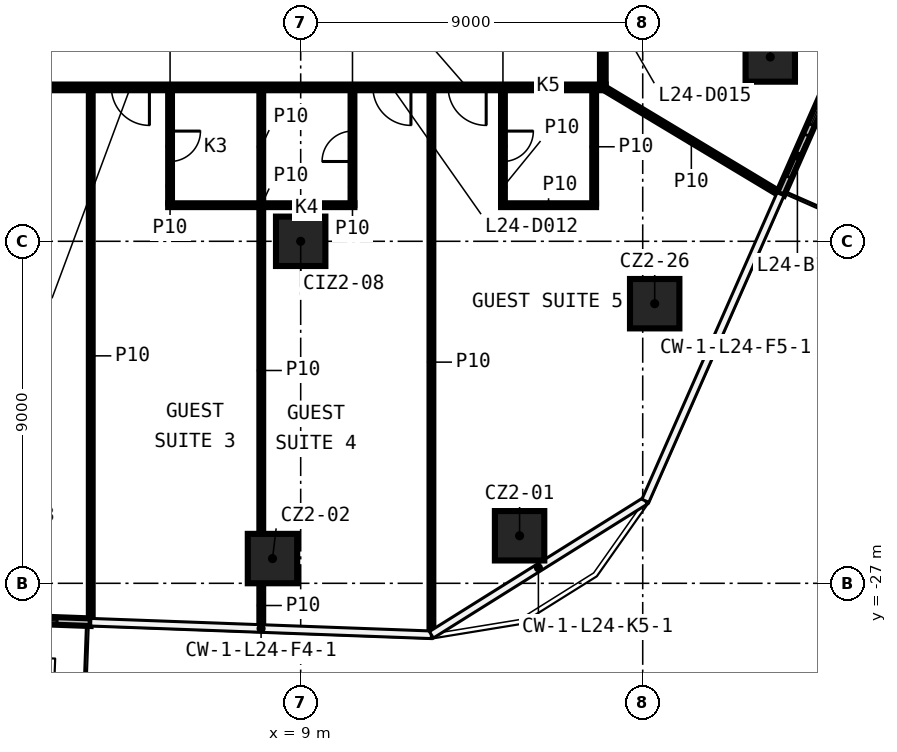
"""IFC4 building model, lengths in metres.
Left out: names, types, materials, properties, quantities, classifications, styles, units other than length and angle.
Written with IfcOpenShell. Run it as: python <this file> out.ifc"""

import sys

from ifc_helpers import new_model, si_unit, direction, frame, frame_2d, origin, origin_2d, place, context, subcontext, project, spatial, rectangle, extrude, element, fill, save


model = new_model("IFC4")
c1 = context("Model", 3, precision=1e-05, world=origin(), true_north=direction((0.0, 1.0)))
c2 = subcontext(c1, "Body", "Model", "MODEL_VIEW")
j1 = project(units=[si_unit("LENGTHUNIT", "METRE"), si_unit("PLANEANGLEUNIT", "RADIAN")], contexts=[c1])
p1 = place(None, origin())
s1 = spatial("IfcSite", under=j1, at=p1, CompositionType="ELEMENT")
p2 = place(p1, origin())
s2 = spatial("IfcBuilding", under=s1, at=p2, CompositionType="ELEMENT")
p3 = place(p2, frame((0.0, 0.0, 113.7)))
s3 = spatial("IfcBuildingStorey", under=s2, at=p3, CompositionType="ELEMENT", Elevation=113.7)
for number, where, z_axis, x_axis in (
    (1, (14.76, -25.749, 0.0), (0.0, 0.0, 1.0), (1.0, 0.0, 0.0)),
    (2, (8.258, -26.349, 0.0), (0.0, 0.0, 1.0), (1.0, 0.0, 0.0)),
    (3, (21.356, -13.15, 0.0), (0.0, 0.0, 1.0), (1.0, 0.0, 0.0)),
    (4, (18.315, -19.642, 0.0), (0.0, 0.0, 1.0), (1.0, 0.0, 0.0)),
    (5, (9.0, -18.0, 0.0), (0.0, 0.0, 1.0), (1.0, 0.0, 0.0)),
):
    element("IfcColumn", number, at=place(p3, frame(where, z_axis=z_axis, x_axis=x_axis)), inside=s3, PredefinedType="COLUMN", context=c2, shape_type="SweptSolid", body=[
        extrude(rectangle(XDim=1.3, YDim=1.3, at=origin_2d()), origin(), (0.0, 0.0, 1.0), 3.3),
    ])
p4 = place(p3, frame((5.513, -17.05, 0.0), z_axis=(0.0, 0.0, 1.0), x_axis=(1.0, 0.0, 0.0)))
e6 = element("IfcWall", 6, at=p4, inside=s3, PredefinedType="PARTITIONING", context=c2, shape_type="SweptSolid", body=[
    extrude(rectangle(XDim=4.9, YDim=0.1, at=frame_2d((2.45, 0.0))), origin(), (0.0, 0.0, 1.0), 3.3),
])
p5 = place(p3, frame((14.272, -17.05, 0.0), z_axis=(0.0, 0.0, 1.0), x_axis=(1.0, 0.0, 0.0)))
e7 = element("IfcWall", 7, at=p5, inside=s3, PredefinedType="PARTITIONING", context=c2, shape_type="SweptSolid", body=[
    extrude(rectangle(XDim=2.5, YDim=0.1, at=frame_2d((1.25, 0.0))), origin(), (0.0, 0.0, 1.0), 3.3),
])
p6 = place(p3, frame((17.025, -13.95, 0.0), z_axis=(0.0, 0.0, 1.0), x_axis=(-1.0, 0.0, 0.0)))
e8 = element("IfcWall", 8, at=p6, inside=s3, PredefinedType="PARTITIONING", context=c2, shape_type="SweptSolid", body=[
    extrude(rectangle(XDim=34.05, YDim=0.15, at=frame_2d((17.025, 0.0))), origin(), (0.0, 0.0, 1.0), 3.3),
])
p7 = place(p6, frame((31.974, 0.0, 0.0)))
e9 = element("IfcOpeningElement", 9, at=p7, cuts=e8, PredefinedType="OPENING", context=c2, shape_type="SweptSolid", body=[
    extrude(rectangle(XDim=0.9, YDim=2.1, at=frame_2d((0.45, 1.05))), frame((0.0, 0.085, 0.0), z_axis=(0.0, -1.0, 0.0), x_axis=(1.0, 0.0, 0.0)), (0.0, 0.0, 1.0), 0.17),
])
p8 = place(p6, frame((27.543, 0.0, 0.0)))
e10 = element("IfcOpeningElement", 10, at=p8, cuts=e8, PredefinedType="OPENING", context=c2, shape_type="SweptSolid", body=[
    extrude(rectangle(XDim=1.0, YDim=2.1, at=frame_2d((0.5, 1.05))), frame((0.0, 0.085, 0.0), z_axis=(0.0, -1.0, 0.0), x_axis=(1.0, 0.0, 0.0)), (0.0, 0.0, 1.0), 0.17),
])
p9 = place(p6, frame((16.333, 0.0, 0.0)))
e11 = element("IfcOpeningElement", 11, at=p9, cuts=e8, PredefinedType="OPENING", context=c2, shape_type="SweptSolid", body=[
    extrude(rectangle(XDim=1.0, YDim=2.1, at=frame_2d((0.5, 1.05))), frame((0.0, 0.085, 0.0), z_axis=(0.0, -1.0, 0.0), x_axis=(1.0, 0.0, 0.0)), (0.0, 0.0, 1.0), 0.17),
])
p10 = place(p6, frame((12.006, 0.0, 0.0)))
e12 = element("IfcOpeningElement", 12, at=p10, cuts=e8, PredefinedType="OPENING", context=c2, shape_type="SweptSolid", body=[
    extrude(rectangle(XDim=1.0, YDim=2.1, at=frame_2d((0.5, 1.05))), frame((0.0, 0.085, 0.0), z_axis=(0.0, -1.0, 0.0), x_axis=(1.0, 0.0, 0.0)), (0.0, 0.0, 1.0), 0.17),
])
p11 = place(p6, frame((5.124, 0.0, 0.0)))
e13 = element("IfcOpeningElement", 13, at=p11, cuts=e8, PredefinedType="OPENING", context=c2, shape_type="SweptSolid", body=[
    extrude(rectangle(XDim=1.0, YDim=2.1, at=frame_2d((0.5, 1.05))), frame((0.0, 0.085, 0.0), z_axis=(0.0, -1.0, 0.0), x_axis=(1.0, 0.0, 0.0)), (0.0, 0.0, 1.0), 0.17),
])
p12 = place(p6, frame((3.144, 0.0, 0.0)))
e14 = element("IfcOpeningElement", 14, at=p12, cuts=e8, PredefinedType="OPENING", context=c2, shape_type="SweptSolid", body=[
    extrude(rectangle(XDim=1.0, YDim=2.1, at=frame_2d((0.5, 1.05))), frame((0.0, 0.085, 0.0), z_axis=(0.0, -1.0, 0.0), x_axis=(1.0, 0.0, 0.0)), (0.0, 0.0, 1.0), 0.17),
])
p13 = place(p3, frame((16.95, 13.875, 0.0), z_axis=(0.0, 0.0, 1.0), x_axis=(0.0, -1.0, 0.0)))
e15 = element("IfcWall", 15, at=p13, inside=s3, PredefinedType="PARTITIONING", context=c2, shape_type="SweptSolid", body=[
    extrude(rectangle(XDim=27.75, YDim=0.15, at=frame_2d((13.875, 0.0))), origin(), (0.0, 0.0, 1.0), 3.3),
])
p14 = place(p13, frame((24.917, 0.0, 0.0)))
e16 = element("IfcOpeningElement", 16, at=p14, cuts=e15, PredefinedType="OPENING", context=c2, shape_type="SweptSolid", body=[
    extrude(rectangle(XDim=0.9, YDim=2.1, at=frame_2d((0.45, 1.05))), frame((0.0, 0.085, 0.0), z_axis=(0.0, -1.0, 0.0), x_axis=(1.0, 0.0, 0.0)), (0.0, 0.0, 1.0), 0.17),
])
p15 = place(p13, frame((20.086, 0.0, 0.0)))
e17 = element("IfcOpeningElement", 17, at=p15, cuts=e15, PredefinedType="OPENING", context=c2, shape_type="SweptSolid", body=[
    extrude(rectangle(XDim=0.9, YDim=2.1, at=frame_2d((0.45, 1.05))), frame((0.0, 0.085, 0.0), z_axis=(0.0, -1.0, 0.0), x_axis=(1.0, 0.0, 0.0)), (0.0, 0.0, 1.0), 0.17),
])
p16 = place(p13, frame((16.047, 0.0, 0.0)))
e18 = element("IfcOpeningElement", 18, at=p16, cuts=e15, PredefinedType="OPENING", context=c2, shape_type="SweptSolid", body=[
    extrude(rectangle(XDim=0.9, YDim=2.1, at=frame_2d((0.45, 1.05))), frame((0.0, 0.085, 0.0), z_axis=(0.0, -1.0, 0.0), x_axis=(1.0, 0.0, 0.0)), (0.0, 0.0, 1.0), 0.17),
])
p17 = place(p13, frame((11.091, 0.0, 0.0)))
e19 = element("IfcOpeningElement", 19, at=p17, cuts=e15, PredefinedType="OPENING", context=c2, shape_type="SweptSolid", body=[
    extrude(rectangle(XDim=0.9, YDim=2.1, at=frame_2d((0.45, 1.05))), frame((0.0, 0.085, 0.0), z_axis=(0.0, -1.0, 0.0), x_axis=(1.0, 0.0, 0.0)), (0.0, 0.0, 1.0), 0.17),
])
p18 = place(p13, frame((7.093, 0.0, 0.0)))
e20 = element("IfcOpeningElement", 20, at=p18, cuts=e15, PredefinedType="OPENING", context=c2, shape_type="SweptSolid", body=[
    extrude(rectangle(XDim=0.9, YDim=2.1, at=frame_2d((0.45, 1.05))), frame((0.0, 0.085, 0.0), z_axis=(0.0, -1.0, 0.0), x_axis=(1.0, 0.0, 0.0)), (0.0, 0.0, 1.0), 0.17),
])
p19 = place(p13, frame((2.057, 0.0, 0.0)))
e21 = element("IfcOpeningElement", 21, at=p19, cuts=e15, PredefinedType="OPENING", context=c2, shape_type="SweptSolid", body=[
    extrude(rectangle(XDim=0.9, YDim=2.1, at=frame_2d((0.45, 1.05))), frame((0.0, 0.085, 0.0), z_axis=(0.0, -1.0, 0.0), x_axis=(1.0, 0.0, 0.0)), (0.0, 0.0, 1.0), 0.17),
])
p20 = place(p3, frame((16.722, -17.0, 0.0), z_axis=(0.0, 0.0, 1.0), x_axis=(0.0, 1.0, 0.0)))
e22 = element("IfcWall", 22, at=p20, inside=s3, PredefinedType="PARTITIONING", context=c2, shape_type="SweptSolid", body=[
    extrude(rectangle(XDim=2.975, YDim=0.1, at=frame_2d((1.488, 0.0))), origin(), (0.0, 0.0, 1.0), 3.3),
])
p21 = place(p3, frame((14.322, -14.025, 0.0), z_axis=(0.0, 0.0, 1.0), x_axis=(0.0, -1.0, 0.0)))
e23 = element("IfcWall", 23, at=p21, inside=s3, PredefinedType="PARTITIONING", context=c2, shape_type="SweptSolid", body=[
    extrude(rectangle(XDim=3.025, YDim=0.1, at=frame_2d((1.513, 0.0))), origin(), (0.0, 0.0, 1.0), 3.3),
])
p22 = place(p21, frame((1.075, 0.0, 0.0)))
e24 = element("IfcOpeningElement", 24, at=p22, cuts=e23, PredefinedType="OPENING", context=c2, shape_type="SweptSolid", body=[
    extrude(rectangle(XDim=0.8, YDim=2.1, at=frame_2d((0.4, 1.05))), frame((0.0, 0.06, 0.0), z_axis=(0.0, -1.0, 0.0), x_axis=(1.0, 0.0, 0.0)), (0.0, 0.0, 1.0), 0.12),
])
p23 = place(p3, frame((12.44, -28.334, 0.0), z_axis=(0.0, 0.0, 1.0), x_axis=(0.0, 1.0, 0.0)))
e25 = element("IfcWall", 25, at=p23, inside=s3, PredefinedType="PARTITIONING", context=c2, shape_type="SweptSolid", body=[
    extrude(rectangle(XDim=14.31, YDim=0.1, at=frame_2d((7.155, 0.0))), origin(), (0.0, 0.0, 1.0), 3.3),
])
p24 = place(p3, frame((10.363, -17.05, 0.0), z_axis=(0.0, 0.0, 1.0), x_axis=(0.0, 1.0, 0.0)))
e26 = element("IfcWall", 26, at=p24, inside=s3, PredefinedType="PARTITIONING", context=c2, shape_type="SweptSolid", body=[
    extrude(rectangle(XDim=3.025, YDim=0.1, at=frame_2d((1.513, 0.0))), origin(), (0.0, 0.0, 1.0), 3.3),
])
p25 = place(p24, frame((1.15, 0.0, 0.0)))
e27 = element("IfcOpeningElement", 27, at=p25, cuts=e26, PredefinedType="OPENING", context=c2, shape_type="SweptSolid", body=[
    extrude(rectangle(XDim=0.8, YDim=2.1, at=frame_2d((0.4, 1.05))), frame((0.0, 0.06, 0.0), z_axis=(0.0, -1.0, 0.0), x_axis=(1.0, 0.0, 0.0)), (0.0, 0.0, 1.0), 0.12),
])
p26 = place(p3, frame((7.963, -28.17, 0.0), z_axis=(0.0, 0.0, 1.0), x_axis=(0.0, 1.0, 0.0)))
e28 = element("IfcWall", 28, at=p26, inside=s3, PredefinedType="PARTITIONING", context=c2, shape_type="SweptSolid", body=[
    extrude(rectangle(XDim=1.171, YDim=0.1, at=frame_2d((0.585, 0.0))), origin(), (0.0, 0.0, 1.0), 3.3),
])
p27 = place(p3, frame((7.963, -25.699, 0.0), z_axis=(0.0, 0.0, 1.0), x_axis=(0.0, 1.0, 0.0)))
e29 = element("IfcWall", 29, at=p27, inside=s3, PredefinedType="PARTITIONING", context=c2, shape_type="SweptSolid", body=[
    extrude(rectangle(XDim=8.599, YDim=0.1, at=frame_2d((4.299, 0.0))), origin(), (0.0, 0.0, 1.0), 3.3),
])
p28 = place(p3, frame((7.963, -17.0, 0.0), z_axis=(0.0, 0.0, 1.0), x_axis=(0.0, 1.0, 0.0)))
e30 = element("IfcWall", 30, at=p28, inside=s3, PredefinedType="PARTITIONING", context=c2, shape_type="SweptSolid", body=[
    extrude(rectangle(XDim=2.975, YDim=0.1, at=frame_2d((1.488, 0.0))), origin(), (0.0, 0.0, 1.0), 3.3),
])
p29 = place(p3, frame((5.563, -14.025, 0.0), z_axis=(0.0, 0.0, 1.0), x_axis=(0.0, -1.0, 0.0)))
e31 = element("IfcWall", 31, at=p29, inside=s3, PredefinedType="PARTITIONING", context=c2, shape_type="SweptSolid", body=[
    extrude(rectangle(XDim=2.975, YDim=0.1, at=frame_2d((1.488, 0.0))), origin(), (0.0, 0.0, 1.0), 3.3),
])
p30 = place(p29, frame((1.075, 0.0, 0.0)))
e32 = element("IfcOpeningElement", 32, at=p30, cuts=e31, PredefinedType="OPENING", context=c2, shape_type="SweptSolid", body=[
    extrude(rectangle(XDim=0.8, YDim=2.1, at=frame_2d((0.4, 1.05))), frame((0.0, 0.06, 0.0), z_axis=(0.0, -1.0, 0.0), x_axis=(1.0, 0.0, 0.0)), (0.0, 0.0, 1.0), 0.12),
])
p31 = place(p3, frame((3.476, -28.004, 0.0), z_axis=(0.0, 0.0, 1.0), x_axis=(0.0, 1.0, 0.0)))
e33 = element("IfcWall", 33, at=p31, inside=s3, PredefinedType="PARTITIONING", context=c2, shape_type="SweptSolid", body=[
    extrude(rectangle(XDim=13.979, YDim=0.1, at=frame_2d((6.99, 0.0))), origin(), (0.0, 0.0, 1.0), 3.3),
])
p32 = place(p3, frame((16.95, -13.95, 0.0), z_axis=(0.0, 0.0, 1.0), x_axis=(0.857183640751, -0.515010879525, 0.0)))
e34 = element("IfcWall", 34, at=p32, inside=s3, PredefinedType="PARTITIONING", context=c2, shape_type="SweptSolid", body=[
    extrude(rectangle(XDim=5.436, YDim=0.1, at=frame_2d((2.718, 0.0))), origin(), (0.0, 0.0, 1.0), 3.3),
])
p33 = place(p3, frame((-9.975, -27.528, 0.0), z_axis=(0.0, 0.0, 1.0), x_axis=(0.999319917794, -0.036874135924, 0.0)))
e35 = element("IfcWall", 35, at=p33, inside=s3, PredefinedType="SOLIDWALL", context=c2, shape_type="SweptSolid", body=[
    extrude(rectangle(XDim=13.46, YDim=0.2, at=frame_2d((6.73, 0.0))), origin(), (0.0, 0.0, 1.0), 3.3),
])
p34 = place(p33, frame((2.0, 0.0, 0.6)))
e36 = element("IfcOpeningElement", 36, at=p34, cuts=e35, PredefinedType="OPENING", context=c2, shape_type="SweptSolid", body=[
    extrude(rectangle(XDim=1.6, YDim=2.4, at=frame_2d((0.8, 1.2))), frame((0.0, 0.11, 0.0), z_axis=(0.0, -1.0, 0.0), x_axis=(1.0, 0.0, 0.0)), (0.0, 0.0, 1.0), 0.22),
])
p35 = place(p33, frame((0.5, 0.0, 0.0)))
e37 = element("IfcOpeningElement", 37, at=p35, cuts=e35, PredefinedType="OPENING", context=c2, shape_type="SweptSolid", body=[
    extrude(rectangle(XDim=1.2, YDim=2.4, at=frame_2d((0.6, 1.2))), frame((0.0, 0.11, 0.0), z_axis=(0.0, -1.0, 0.0), x_axis=(1.0, 0.0, 0.0)), (0.0, 0.0, 1.0), 0.22),
])
p36 = place(p33, frame((4.987, 0.0, 0.6)))
e38 = element("IfcOpeningElement", 38, at=p36, cuts=e35, PredefinedType="OPENING", context=c2, shape_type="SweptSolid", body=[
    extrude(rectangle(XDim=1.6, YDim=2.4, at=frame_2d((0.8, 1.2))), frame((0.0, 0.11, 0.0), z_axis=(0.0, -1.0, 0.0), x_axis=(1.0, 0.0, 0.0)), (0.0, 0.0, 1.0), 0.22),
])
p37 = place(p33, frame((6.887, 0.0, 0.0)))
e39 = element("IfcOpeningElement", 39, at=p37, cuts=e35, PredefinedType="OPENING", context=c2, shape_type="SweptSolid", body=[
    extrude(rectangle(XDim=1.2, YDim=2.4, at=frame_2d((0.6, 1.2))), frame((0.0, 0.11, 0.0), z_axis=(0.0, -1.0, 0.0), x_axis=(1.0, 0.0, 0.0)), (0.0, 0.0, 1.0), 0.22),
])
p38 = place(p33, frame((10.974, 0.0, 0.6)))
e40 = element("IfcOpeningElement", 40, at=p38, cuts=e35, PredefinedType="OPENING", context=c2, shape_type="SweptSolid", body=[
    extrude(rectangle(XDim=1.6, YDim=2.4, at=frame_2d((0.8, 1.2))), frame((0.0, 0.11, 0.0), z_axis=(0.0, -1.0, 0.0), x_axis=(1.0, 0.0, 0.0)), (0.0, 0.0, 1.0), 0.22),
])
p39 = place(p33, frame((9.474, 0.0, 0.0)))
e41 = element("IfcOpeningElement", 41, at=p39, cuts=e35, PredefinedType="OPENING", context=c2, shape_type="SweptSolid", body=[
    extrude(rectangle(XDim=1.2, YDim=2.4, at=frame_2d((0.6, 1.2))), frame((0.0, 0.11, 0.0), z_axis=(0.0, -1.0, 0.0), x_axis=(1.0, 0.0, 0.0)), (0.0, 0.0, 1.0), 0.22),
])
p40 = place(p3, frame((21.626, -16.76, 0.0), z_axis=(0.0, 0.0, 1.0), x_axis=(0.403293642116, 0.915070619258, 0.0)))
e42 = element("IfcWall", 42, at=p40, inside=s3, PredefinedType="SOLIDWALL", context=c2, shape_type="SweptSolid", body=[
    extrude(rectangle(XDim=17.657, YDim=0.2, at=frame_2d((8.829, 0.0))), origin(), (0.0, 0.0, 1.0), 3.3),
])
p41 = place(p40, frame((2.0, 0.0, 0.6)))
e43 = element("IfcOpeningElement", 43, at=p41, cuts=e42, PredefinedType="OPENING", context=c2, shape_type="SweptSolid", body=[
    extrude(rectangle(XDim=1.6, YDim=2.4, at=frame_2d((0.8, 1.2))), frame((0.0, 0.11, 0.0), z_axis=(0.0, -1.0, 0.0), x_axis=(1.0, 0.0, 0.0)), (0.0, 0.0, 1.0), 0.22),
])
p42 = place(p40, frame((0.5, 0.0, 0.0)))
e44 = element("IfcOpeningElement", 44, at=p42, cuts=e42, PredefinedType="OPENING", context=c2, shape_type="SweptSolid", body=[
    extrude(rectangle(XDim=1.2, YDim=2.4, at=frame_2d((0.6, 1.2))), frame((0.0, 0.11, 0.0), z_axis=(0.0, -1.0, 0.0), x_axis=(1.0, 0.0, 0.0)), (0.0, 0.0, 1.0), 0.22),
])
p43 = place(p40, frame((6.414, 0.0, 0.6)))
e45 = element("IfcOpeningElement", 45, at=p43, cuts=e42, PredefinedType="OPENING", context=c2, shape_type="SweptSolid", body=[
    extrude(rectangle(XDim=1.6, YDim=2.4, at=frame_2d((0.8, 1.2))), frame((0.0, 0.11, 0.0), z_axis=(0.0, -1.0, 0.0), x_axis=(1.0, 0.0, 0.0)), (0.0, 0.0, 1.0), 0.22),
])
p44 = place(p40, frame((4.914, 0.0, 0.0)))
e46 = element("IfcOpeningElement", 46, at=p44, cuts=e42, PredefinedType="OPENING", context=c2, shape_type="SweptSolid", body=[
    extrude(rectangle(XDim=1.2, YDim=2.4, at=frame_2d((0.6, 1.2))), frame((0.0, 0.11, 0.0), z_axis=(0.0, -1.0, 0.0), x_axis=(1.0, 0.0, 0.0)), (0.0, 0.0, 1.0), 0.22),
])
p45 = place(p40, frame((9.329, 0.0, 0.6)))
e47 = element("IfcOpeningElement", 47, at=p45, cuts=e42, PredefinedType="OPENING", context=c2, shape_type="SweptSolid", body=[
    extrude(rectangle(XDim=1.6, YDim=2.4, at=frame_2d((0.8, 1.2))), frame((0.0, 0.11, 0.0), z_axis=(0.0, -1.0, 0.0), x_axis=(1.0, 0.0, 0.0)), (0.0, 0.0, 1.0), 0.22),
])
p46 = place(p40, frame((11.329, 0.0, 0.0)))
e48 = element("IfcOpeningElement", 48, at=p46, cuts=e42, PredefinedType="OPENING", context=c2, shape_type="SweptSolid", body=[
    extrude(rectangle(XDim=1.2, YDim=2.4, at=frame_2d((0.6, 1.2))), frame((0.0, 0.11, 0.0), z_axis=(0.0, -1.0, 0.0), x_axis=(1.0, 0.0, 0.0)), (0.0, 0.0, 1.0), 0.22),
])
p47 = place(p40, frame((15.243, 0.0, 0.6)))
e49 = element("IfcOpeningElement", 49, at=p47, cuts=e42, PredefinedType="OPENING", context=c2, shape_type="SweptSolid", body=[
    extrude(rectangle(XDim=1.6, YDim=2.4, at=frame_2d((0.8, 1.2))), frame((0.0, 0.11, 0.0), z_axis=(0.0, -1.0, 0.0), x_axis=(1.0, 0.0, 0.0)), (0.0, 0.0, 1.0), 0.22),
])
p48 = place(p40, frame((13.743, 0.0, 0.0)))
e50 = element("IfcOpeningElement", 50, at=p48, cuts=e42, PredefinedType="OPENING", context=c2, shape_type="SweptSolid", body=[
    extrude(rectangle(XDim=1.2, YDim=2.4, at=frame_2d((0.6, 1.2))), frame((0.0, 0.11, 0.0), z_axis=(0.0, -1.0, 0.0), x_axis=(1.0, 0.0, 0.0)), (0.0, 0.0, 1.0), 0.22),
])
p49 = place(p30, origin())
e51 = element("IfcDoor", 51, at=p49, inside=s3, OperationType="SINGLE_SWING_RIGHT", PredefinedType="DOOR", context=c2, shape_type="SweptSolid", body=[
    extrude(rectangle(XDim=0.8, YDim=2.1, at=frame_2d((0.4, 1.05))), frame((0.0, 0.025, 0.0), z_axis=(0.0, -1.0, 0.0), x_axis=(1.0, 0.0, 0.0)), (0.0, 0.0, 1.0), 0.05),
])
fill(e32, e51)
p50 = place(p10, origin())
e52 = element("IfcDoor", 52, at=p50, inside=s3, OperationType="SINGLE_SWING_LEFT", PredefinedType="DOOR", context=c2, shape_type="SweptSolid", body=[
    extrude(rectangle(XDim=1.0, YDim=2.1, at=frame_2d((0.5, 1.05))), frame((0.0, 0.025, 0.0), z_axis=(0.0, -1.0, 0.0), x_axis=(1.0, 0.0, 0.0)), (0.0, 0.0, 1.0), 0.05),
])
fill(e12, e52)
p51 = place(p25, origin())
e53 = element("IfcDoor", 53, at=p51, inside=s3, OperationType="SINGLE_SWING_LEFT", PredefinedType="DOOR", context=c2, shape_type="SweptSolid", body=[
    extrude(rectangle(XDim=0.8, YDim=2.1, at=frame_2d((0.4, 1.05))), frame((0.0, 0.025, 0.0), z_axis=(0.0, -1.0, 0.0), x_axis=(1.0, 0.0, 0.0)), (0.0, 0.0, 1.0), 0.05),
])
fill(e27, e53)
p52 = place(p11, origin())
e54 = element("IfcDoor", 54, at=p52, inside=s3, OperationType="SINGLE_SWING_RIGHT", PredefinedType="DOOR", context=c2, shape_type="SweptSolid", body=[
    extrude(rectangle(XDim=1.0, YDim=2.1, at=frame_2d((0.5, 1.05))), frame((0.0, 0.025, 0.0), z_axis=(0.0, -1.0, 0.0), x_axis=(1.0, 0.0, 0.0)), (0.0, 0.0, 1.0), 0.05),
])
fill(e13, e54)
p53 = place(p22, origin())
e55 = element("IfcDoor", 55, at=p53, inside=s3, OperationType="SINGLE_SWING_RIGHT", PredefinedType="DOOR", context=c2, shape_type="SweptSolid", body=[
    extrude(rectangle(XDim=0.8, YDim=2.1, at=frame_2d((0.4, 1.05))), frame((0.0, 0.025, 0.0), z_axis=(0.0, -1.0, 0.0), x_axis=(1.0, 0.0, 0.0)), (0.0, 0.0, 1.0), 0.05),
])
fill(e24, e55)
p54 = place(p12, origin())
e56 = element("IfcDoor", 56, at=p54, inside=s3, OperationType="SINGLE_SWING_LEFT", PredefinedType="DOOR", context=c2, shape_type="SweptSolid", body=[
    extrude(rectangle(XDim=1.0, YDim=2.1, at=frame_2d((0.5, 1.05))), frame((0.0, 0.025, 0.0), z_axis=(0.0, -1.0, 0.0), x_axis=(1.0, 0.0, 0.0)), (0.0, 0.0, 1.0), 0.05),
])
fill(e14, e56)
p55 = place(p38, origin())
e57 = element("IfcWindow", 57, at=p55, inside=s3, PartitioningType="SINGLE_PANEL", PredefinedType="WINDOW", context=c2, shape_type="SweptSolid", body=[
    extrude(rectangle(XDim=1.6, YDim=2.4, at=frame_2d((0.8, 1.2))), frame((0.0, 0.03, 0.0), z_axis=(0.0, -1.0, 0.0), x_axis=(1.0, 0.0, 0.0)), (0.0, 0.0, 1.0), 0.06),
])
fill(e40, e57)
p56 = place(p41, origin())
e58 = element("IfcWindow", 58, at=p56, inside=s3, PartitioningType="SINGLE_PANEL", PredefinedType="WINDOW", context=c2, shape_type="SweptSolid", body=[
    extrude(rectangle(XDim=1.6, YDim=2.4, at=frame_2d((0.8, 1.2))), frame((0.0, 0.03, 0.0), z_axis=(0.0, -1.0, 0.0), x_axis=(1.0, 0.0, 0.0)), (0.0, 0.0, 1.0), 0.06),
])
fill(e43, e58)
p57 = place(p42, origin())
e59 = element("IfcDoor", 59, at=p57, inside=s3, OperationType="SLIDING_TO_LEFT", PredefinedType="DOOR", context=c2, shape_type="SweptSolid", body=[
    extrude(rectangle(XDim=1.2, YDim=2.4, at=frame_2d((0.6, 1.2))), frame((0.0, 0.025, 0.0), z_axis=(0.0, -1.0, 0.0), x_axis=(1.0, 0.0, 0.0)), (0.0, 0.0, 1.0), 0.05),
])
fill(e44, e59)
save(model, sys.argv[1])
